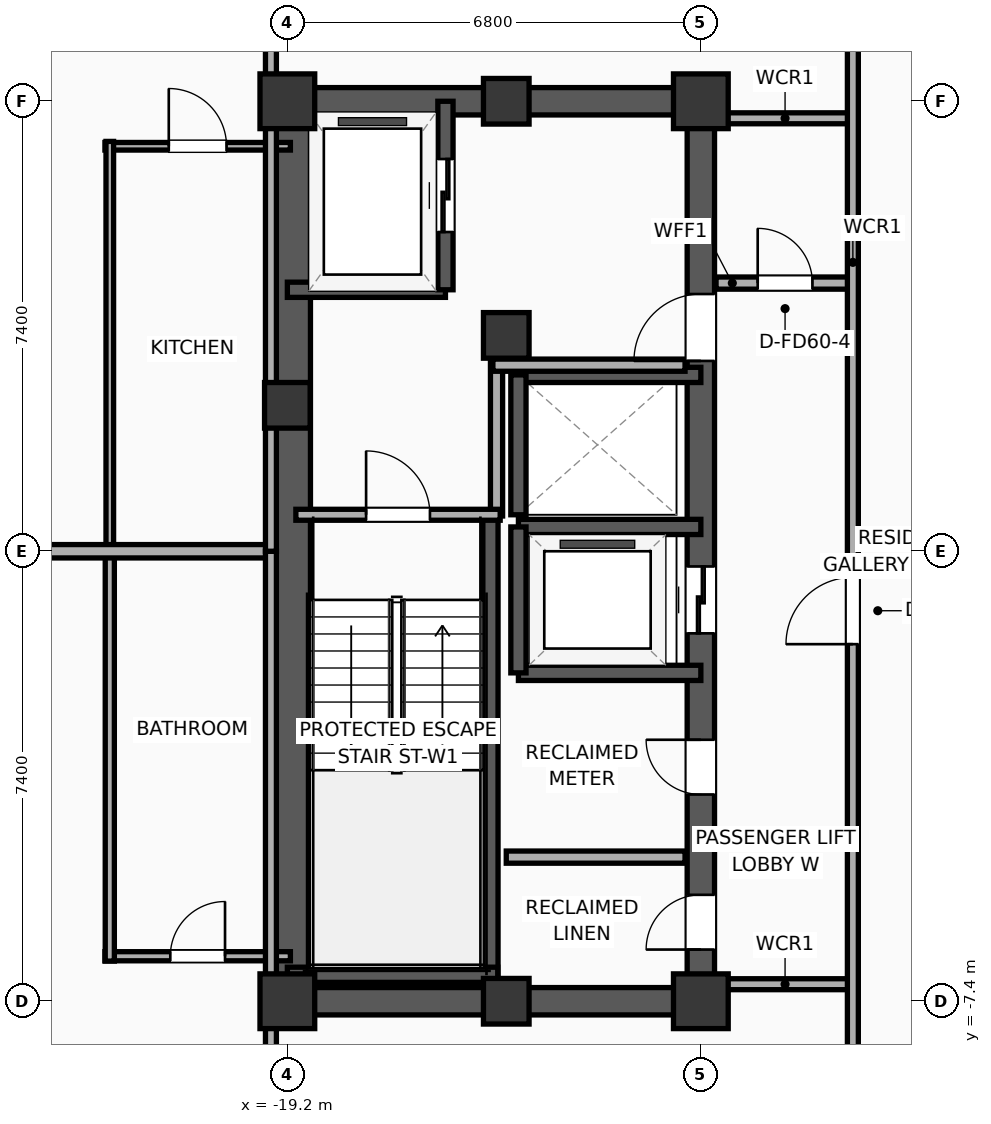
"""IFC4 building model, lengths in metres.
Left out: names, types, materials, properties, quantities, classifications, styles, units other than length and angle.
Written with IfcOpenShell. Run it as: python <this file> out.ifc"""

import sys

from ifc_helpers import new_model, si_unit, direction, frame, frame_2d, origin, origin_2d, place, context, subcontext, project, spatial, rectangle, extrude, element, fill, save


model = new_model("IFC4")
c1 = context("Model", 3, precision=1e-05, world=origin(), true_north=direction((0.0, 1.0)))
c2 = subcontext(c1, "Body", "Model", "MODEL_VIEW")
j1 = project(units=[si_unit("LENGTHUNIT", "METRE"), si_unit("PLANEANGLEUNIT", "RADIAN")], contexts=[c1])
p1 = place(None, origin())
s1 = spatial("IfcSite", under=j1, at=p1, CompositionType="ELEMENT")
p2 = place(p1, origin())
s2 = spatial("IfcBuilding", under=s1, at=p2, CompositionType="ELEMENT")
p3 = place(p2, frame((0.0, 0.0, 183.3)))
s3 = spatial("IfcBuildingStorey", under=s2, at=p3, CompositionType="ELEMENT", Elevation=183.3)
p4 = place(p3, frame((-19.2, -7.4, 0.0), z_axis=(0.0, 0.0, 1.0), x_axis=(1.0, 0.0, 0.0)))
e1 = element("IfcColumn", 1, at=p4, inside=s3, PredefinedType="COLUMN", context=c2, shape_type="SweptSolid", body=[
    extrude(rectangle(XDim=0.9, YDim=0.9, at=origin_2d()), origin(), (0.0, 0.0, 1.0), 3.9),
])
p5 = place(p3, frame((-19.2, 2.4, 0.0), z_axis=(0.0, 0.0, 1.0), x_axis=(1.0, 0.0, 0.0)))
e2 = element("IfcColumn", 2, at=p5, inside=s3, PredefinedType="COLUMN", context=c2, shape_type="SweptSolid", body=[
    extrude(rectangle(XDim=0.75, YDim=0.75, at=origin_2d()), origin(), (0.0, 0.0, 1.0), 3.9),
])
p6 = place(p3, frame((-19.2, 7.4, 0.0), z_axis=(0.0, 0.0, 1.0), x_axis=(1.0, 0.0, 0.0)))
e3 = element("IfcColumn", 3, at=p6, inside=s3, PredefinedType="COLUMN", context=c2, shape_type="SweptSolid", body=[
    extrude(rectangle(XDim=0.9, YDim=0.9, at=origin_2d()), origin(), (0.0, 0.0, 1.0), 3.9),
])
for number, where, z_axis, x_axis in (
    (4, (-15.6, -7.4, 0.0), (0.0, 0.0, 1.0), (1.0, 0.0, 0.0)),
    (5, (-15.6, 7.4, 0.0), (0.0, 0.0, 1.0), (1.0, 0.0, 0.0)),
):
    element("IfcColumn", number, at=place(p3, frame(where, z_axis=z_axis, x_axis=x_axis)), inside=s3, PredefinedType="COLUMN", context=c2, shape_type="SweptSolid", body=[
        extrude(rectangle(XDim=0.75, YDim=0.75, at=origin_2d()), origin(), (0.0, 0.0, 1.0), 3.9),
    ])
p7 = place(p3, frame((-12.4, -7.4, 0.0), z_axis=(0.0, 0.0, 1.0), x_axis=(1.0, 0.0, 0.0)))
e6 = element("IfcColumn", 6, at=p7, inside=s3, PredefinedType="COLUMN", context=c2, shape_type="SweptSolid", body=[
    extrude(rectangle(XDim=0.9, YDim=0.9, at=origin_2d()), origin(), (0.0, 0.0, 1.0), 3.9),
])
p8 = place(p3, frame((-15.6, 3.55, 0.0), z_axis=(0.0, 0.0, 1.0), x_axis=(1.0, 0.0, 0.0)))
e7 = element("IfcColumn", 7, at=p8, inside=s3, PredefinedType="COLUMN", context=c2, shape_type="SweptSolid", body=[
    extrude(rectangle(XDim=0.75, YDim=0.75, at=origin_2d()), origin(), (0.0, 0.0, 1.0), 3.9),
])
p9 = place(p3, frame((-12.4, 7.4, 0.0), z_axis=(0.0, 0.0, 1.0), x_axis=(1.0, 0.0, 0.0)))
e8 = element("IfcColumn", 8, at=p9, inside=s3, PredefinedType="COLUMN", context=c2, shape_type="SweptSolid", body=[
    extrude(rectangle(XDim=0.9, YDim=0.9, at=origin_2d()), origin(), (0.0, 0.0, 1.0), 3.9),
])
for number, where, z_axis, x_axis in (
    (9, (-19.425, -7.4, 0.0), (0.0, 0.0, 1.0), (1.0, 0.0, 0.0)),
    (10, (-19.425, 7.4, 0.0), (0.0, 0.0, 1.0), (1.0, 0.0, 0.0)),
):
    element("IfcWall", number, at=place(p3, frame(where, z_axis=z_axis, x_axis=x_axis)), inside=s3, PredefinedType="SHEAR", context=c2, shape_type="SweptSolid", body=[
        extrude(rectangle(XDim=7.25, YDim=0.45, at=frame_2d((3.625, 0.0))), origin(), (0.0, 0.0, 1.0), 3.65),
    ])
p10 = place(p3, frame((-19.145, -7.4, 0.0), z_axis=(0.0, 0.0, 1.0), x_axis=(0.0, 1.0, 0.0)))
e11 = element("IfcWall", 11, at=p10, inside=s3, PredefinedType="SHEAR", context=c2, shape_type="SweptSolid", body=[
    extrude(rectangle(XDim=14.8, YDim=0.65, at=frame_2d((7.4, 0.0))), origin(), (0.0, 0.0, 1.0), 3.65),
])
p11 = place(p3, frame((-12.4, -7.4, 0.0), z_axis=(0.0, 0.0, 1.0), x_axis=(0.0, 1.0, 0.0)))
e12 = element("IfcWall", 12, at=p11, inside=s3, PredefinedType="SHEAR", context=c2, shape_type="SweptSolid", body=[
    extrude(rectangle(XDim=14.8, YDim=0.45, at=frame_2d((7.4, 0.0))), origin(), (0.0, 0.0, 1.0), 3.65),
])
p12 = place(p11, frame((6.05, 0.0, 0.0)))
e13 = element("IfcOpeningElement", 13, at=p12, cuts=e12, PredefinedType="OPENING", context=c2, shape_type="SweptSolid", body=[
    extrude(rectangle(XDim=1.1, YDim=2.05, at=frame_2d((0.55, 1.025))), frame((0.0, 0.235, 0.0), z_axis=(0.0, -1.0, 0.0), x_axis=(1.0, 0.0, 0.0)), (0.0, 0.0, 1.0), 0.47),
])
p13 = place(p11, frame((10.53, 0.0, 0.0)))
e14 = element("IfcOpeningElement", 14, at=p13, cuts=e12, PredefinedType="OPENING", context=c2, shape_type="SweptSolid", body=[
    extrude(rectangle(XDim=1.1, YDim=2.05, at=frame_2d((0.55, 1.025))), frame((0.0, 0.235, 0.0), z_axis=(0.0, -1.0, 0.0), x_axis=(1.0, 0.0, 0.0)), (0.0, 0.0, 1.0), 0.47),
])
p14 = place(p11, frame((0.85, 0.0, 0.0)))
e15 = element("IfcOpeningElement", 15, at=p14, cuts=e12, PredefinedType="OPENING", context=c2, shape_type="SweptSolid", body=[
    extrude(rectangle(XDim=0.9, YDim=2.05, at=frame_2d((0.45, 1.025))), frame((0.0, 0.235, 0.0), z_axis=(0.0, -1.0, 0.0), x_axis=(1.0, 0.0, 0.0)), (0.0, 0.0, 1.0), 0.47),
])
p15 = place(p11, frame((3.4, 0.0, 0.0)))
e16 = element("IfcOpeningElement", 16, at=p15, cuts=e12, PredefinedType="OPENING", context=c2, shape_type="SweptSolid", body=[
    extrude(rectangle(XDim=0.9, YDim=2.05, at=frame_2d((0.45, 1.025))), frame((0.0, 0.235, 0.0), z_axis=(0.0, -1.0, 0.0), x_axis=(1.0, 0.0, 0.0)), (0.0, 0.0, 1.0), 0.47),
])
p16 = place(p3, frame((-15.86, -7.085, 0.0), z_axis=(0.0, 0.0, 1.0), x_axis=(0.0, 1.0, 0.0)))
e17 = element("IfcWall", 17, at=p16, inside=s3, PredefinedType="SOLIDWALL", context=c2, shape_type="SweptSolid", body=[
    extrude(rectangle(XDim=7.685, YDim=0.25, at=frame_2d((3.843, 0.0))), origin(), (0.0, 0.0, 1.0), 3.65),
])
p17 = place(p3, frame((-19.2, -6.965, 0.0), z_axis=(0.0, 0.0, 1.0), x_axis=(1.0, 0.0, 0.0)))
e18 = element("IfcWall", 18, at=p17, inside=s3, PredefinedType="SOLIDWALL", context=c2, shape_type="SweptSolid", body=[
    extrude(rectangle(XDim=3.46, YDim=0.25, at=frame_2d((1.73, 0.0))), origin(), (0.0, 0.0, 1.0), 3.65),
])
p18 = place(p3, frame((-19.2, 4.3, 0.0), z_axis=(0.0, 0.0, 1.0), x_axis=(1.0, 0.0, 0.0)))
e19 = element("IfcWall", 19, at=p18, inside=s3, PredefinedType="SOLIDWALL", context=c2, shape_type="SweptSolid", body=[
    extrude(rectangle(XDim=2.6, YDim=0.25, at=frame_2d((1.3, 0.0))), origin(), (0.0, 0.0, 1.0), 3.65),
])
p19 = place(p3, frame((-16.6, 4.3, 0.0), z_axis=(0.0, 0.0, 1.0), x_axis=(0.0, 1.0, 0.0)))
e20 = element("IfcWall", 20, at=p19, inside=s3, PredefinedType="SOLIDWALL", context=c2, shape_type="SweptSolid", body=[
    extrude(rectangle(XDim=3.1, YDim=0.25, at=frame_2d((1.55, 0.0))), origin(), (0.0, 0.0, 1.0), 3.65),
])
p20 = place(p19, frame((0.95, 0.0, 0.0)))
e21 = element("IfcOpeningElement", 21, at=p20, cuts=e20, PredefinedType="OPENING", context=c2, shape_type="SweptSolid", body=[
    extrude(rectangle(XDim=1.2, YDim=2.05, at=frame_2d((0.6, 1.025))), frame((0.0, 0.135, 0.0), z_axis=(0.0, -1.0, 0.0), x_axis=(1.0, 0.0, 0.0)), (0.0, 0.0, 1.0), 0.27),
])
for number, where, z_axis, x_axis in (
    (22, (-15.4, -2.0, 0.0), (0.0, 0.0, 1.0), (1.0, 0.0, 0.0)),
    (23, (-12.4, 0.4, 0.0), (0.0, 0.0, 1.0), (-1.0, 0.0, 0.0)),
):
    element("IfcWall", number, at=place(p3, frame(where, z_axis=z_axis, x_axis=x_axis)), inside=s3, PredefinedType="SOLIDWALL", context=c2, shape_type="SweptSolid", body=[
        extrude(rectangle(XDim=3.0, YDim=0.25, at=frame_2d((1.5, 0.0))), origin(), (0.0, 0.0, 1.0), 3.65),
    ])
p21 = place(p3, frame((-15.4, 0.4, 0.0), z_axis=(0.0, 0.0, 1.0), x_axis=(0.0, -1.0, 0.0)))
e24 = element("IfcWall", 24, at=p21, inside=s3, PredefinedType="SOLIDWALL", context=c2, shape_type="SweptSolid", body=[
    extrude(rectangle(XDim=2.4, YDim=0.25, at=frame_2d((1.2, 0.0))), origin(), (0.0, 0.0, 1.0), 3.65),
])
p22 = place(p3, frame((-12.4, 2.9, 0.0), z_axis=(0.0, 0.0, 1.0), x_axis=(-1.0, 0.0, 0.0)))
e25 = element("IfcWall", 25, at=p22, inside=s3, PredefinedType="SOLIDWALL", context=c2, shape_type="SweptSolid", body=[
    extrude(rectangle(XDim=3.0, YDim=0.25, at=frame_2d((1.5, 0.0))), origin(), (0.0, 0.0, 1.0), 3.65),
])
p23 = place(p3, frame((-15.4, 2.9, 0.0), z_axis=(0.0, 0.0, 1.0), x_axis=(0.0, -1.0, 0.0)))
e26 = element("IfcWall", 26, at=p23, inside=s3, PredefinedType="SOLIDWALL", context=c2, shape_type="SweptSolid", body=[
    extrude(rectangle(XDim=2.3, YDim=0.25, at=frame_2d((1.15, 0.0))), origin(), (0.0, 0.0, 1.0), 3.65),
])
p24 = place(p3, frame((-15.76, 0.58, 0.0), z_axis=(0.0, 0.0, 1.0), x_axis=(0.0, 1.0, 0.0)))
e27 = element("IfcWall", 27, at=p24, inside=s3, PredefinedType="PARTITIONING", context=c2, shape_type="SweptSolid", body=[
    extrude(rectangle(XDim=2.52, YDim=0.2, at=frame_2d((1.26, 0.0))), origin(), (0.0, 0.0, 1.0), 3.65),
])
p25 = place(p3, frame((-15.82, 3.06, 0.0), z_axis=(0.0, 0.0, 1.0), x_axis=(1.0, 0.0, 0.0)))
e28 = element("IfcWall", 28, at=p25, inside=s3, PredefinedType="PARTITIONING", context=c2, shape_type="SweptSolid", body=[
    extrude(rectangle(XDim=3.16, YDim=0.2, at=frame_2d((1.58, 0.0))), origin(), (0.0, 0.0, 1.0), 3.65),
])
p26 = place(p3, frame((-19.06, 0.6, 0.0), z_axis=(0.0, 0.0, 1.0), x_axis=(1.0, 0.0, 0.0)))
e29 = element("IfcWall", 29, at=p26, inside=s3, PredefinedType="PARTITIONING", context=c2, shape_type="SweptSolid", body=[
    extrude(rectangle(XDim=3.36, YDim=0.18, at=frame_2d((1.68, 0.0))), origin(), (0.0, 0.0, 1.0), 3.65),
])
p27 = place(p26, frame((1.155, 0.0, 0.0)))
e30 = element("IfcOpeningElement", 30, at=p27, cuts=e29, PredefinedType="OPENING", context=c2, shape_type="SweptSolid", body=[
    extrude(rectangle(XDim=1.05, YDim=2.05, at=frame_2d((0.525, 1.025))), frame((0.0, 0.1, 0.0), z_axis=(0.0, -1.0, 0.0), x_axis=(1.0, 0.0, 0.0)), (0.0, 0.0, 1.0), 0.2),
])
p28 = place(p3, frame((-15.6, -5.03, 0.0), z_axis=(0.0, 0.0, 1.0), x_axis=(1.0, 0.0, 0.0)))
e31 = element("IfcWall", 31, at=p28, inside=s3, PredefinedType="PARTITIONING", context=c2, shape_type="SweptSolid", body=[
    extrude(rectangle(XDim=2.94, YDim=0.2, at=frame_2d((1.47, 0.0))), origin(), (0.0, 0.0, 1.0), 3.65),
])
p29 = place(p3, frame((-12.15, 4.41, 0.0), z_axis=(0.0, 0.0, 1.0), x_axis=(1.0, 0.0, 0.0)))
e32 = element("IfcWall", 32, at=p29, inside=s3, PredefinedType="PARTITIONING", context=c2, shape_type="SweptSolid", body=[
    extrude(rectangle(XDim=2.27, YDim=0.2, at=frame_2d((1.135, 0.0))), origin(), (0.0, 0.0, 1.0), 3.65),
])
p30 = place(p29, frame((0.685, 0.0, 0.0)))
e33 = element("IfcOpeningElement", 33, at=p30, cuts=e32, PredefinedType="OPENING", context=c2, shape_type="SweptSolid", body=[
    extrude(rectangle(XDim=0.9, YDim=2.05, at=frame_2d((0.45, 1.025))), frame((0.0, 0.11, 0.0), z_axis=(0.0, -1.0, 0.0), x_axis=(1.0, 0.0, 0.0)), (0.0, 0.0, 1.0), 0.22),
])
for number, where, z_axis, x_axis in (
    (34, (-12.15, 7.12, 0.0), (0.0, 0.0, 1.0), (1.0, 0.0, 0.0)),
    (35, (-12.15, -7.12, 0.0), (0.0, 0.0, 1.0), (1.0, 0.0, 0.0)),
):
    element("IfcWall", number, at=place(p3, frame(where, z_axis=z_axis, x_axis=x_axis)), inside=s3, PredefinedType="PARTITIONING", context=c2, shape_type="SweptSolid", body=[
        extrude(rectangle(XDim=2.27, YDim=0.18, at=frame_2d((1.135, 0.0))), origin(), (0.0, 0.0, 1.0), 3.65),
    ])
p31 = place(p3, frame((-9.9, -9.78, 0.0), z_axis=(0.0, 0.0, 1.0), x_axis=(0.0, 1.0, 0.0)))
e36 = element("IfcWall", 36, at=p31, inside=s3, PredefinedType="PARTITIONING", context=c2, shape_type="SweptSolid", body=[
    extrude(rectangle(XDim=19.56, YDim=0.18, at=frame_2d((9.78, 0.0))), origin(), (0.0, 0.0, 1.0), 3.65),
])
p32 = place(p31, frame((8.252, 0.0, 0.0)))
e37 = element("IfcOpeningElement", 37, at=p32, cuts=e36, PredefinedType="OPENING", context=c2, shape_type="SweptSolid", body=[
    extrude(rectangle(XDim=1.1, YDim=2.05, at=frame_2d((0.55, 1.025))), frame((0.0, 0.1, 0.0), z_axis=(0.0, -1.0, 0.0), x_axis=(1.0, 0.0, 0.0)), (0.0, 0.0, 1.0), 0.2),
])
p33 = place(p3, frame((-22.2, -6.66, 0.0), z_axis=(0.0, 0.0, 1.0), x_axis=(1.0, 0.0, 0.0)))
e38 = element("IfcWall", 38, at=p33, inside=s3, PredefinedType="PLUMBINGWALL", context=c2, shape_type="SweptSolid", body=[
    extrude(rectangle(XDim=3.05, YDim=0.15, at=frame_2d((1.525, 0.0))), origin(), (0.0, 0.0, 1.0), 3.65),
])
p34 = place(p33, frame((1.075, 0.0, 0.0)))
e39 = element("IfcOpeningElement", 39, at=p34, cuts=e38, PredefinedType="OPENING", context=c2, shape_type="SweptSolid", body=[
    extrude(rectangle(XDim=0.9, YDim=2.05, at=frame_2d((0.45, 1.025))), frame((0.0, 0.085, 0.0), z_axis=(0.0, -1.0, 0.0), x_axis=(1.0, 0.0, 0.0)), (0.0, 0.0, 1.0), 0.17),
])
p35 = place(p3, frame((-22.12, -6.74, 0.0), z_axis=(0.0, 0.0, 1.0), x_axis=(0.0, 1.0, 0.0)))
e40 = element("IfcWall", 40, at=p35, inside=s3, PredefinedType="PLUMBINGWALL", context=c2, shape_type="SweptSolid", body=[
    extrude(rectangle(XDim=6.72, YDim=0.15, at=frame_2d((3.36, 0.0))), origin(), (0.0, 0.0, 1.0), 3.65),
])
p36 = place(p3, frame((-22.2, 6.66, 0.0), z_axis=(0.0, 0.0, 1.0), x_axis=(1.0, 0.0, 0.0)))
e41 = element("IfcWall", 41, at=p36, inside=s3, PredefinedType="PARTITIONING", context=c2, shape_type="SweptSolid", body=[
    extrude(rectangle(XDim=3.05, YDim=0.125, at=frame_2d((1.525, 0.0))), origin(), (0.0, 0.0, 1.0), 3.04),
])
p37 = place(p36, frame((1.05, 0.0, 0.0)))
e42 = element("IfcOpeningElement", 42, at=p37, cuts=e41, PredefinedType="OPENING", context=c2, shape_type="SweptSolid", body=[
    extrude(rectangle(XDim=0.95, YDim=2.05, at=frame_2d((0.475, 1.025))), frame((0.0, 0.073, 0.0), z_axis=(0.0, -1.0, 0.0), x_axis=(1.0, 0.0, 0.0)), (0.0, 0.0, 1.0), 0.145),
])
p38 = place(p3, frame((-22.12, 0.02, 0.0), z_axis=(0.0, 0.0, 1.0), x_axis=(0.0, 1.0, 0.0)))
e43 = element("IfcWall", 43, at=p38, inside=s3, PredefinedType="PARTITIONING", context=c2, shape_type="SweptSolid", body=[
    extrude(rectangle(XDim=6.72, YDim=0.125, at=frame_2d((3.36, 0.0))), origin(), (0.0, 0.0, 1.0), 3.65),
])
p39 = place(p3, frame((-19.47, 0.0, 0.0), z_axis=(0.0, 0.0, 1.0), x_axis=(-1.0, 0.0, 0.0)))
e44 = element("IfcWall", 44, at=p39, inside=s3, PredefinedType="PARTITIONING", context=c2, shape_type="SweptSolid", body=[
    extrude(rectangle(XDim=13.586, YDim=0.22, at=frame_2d((6.793, 0.0))), origin(), (0.0, 0.0, 1.0), 3.65),
])
p40 = place(p3, frame((-19.47, -22.652, 0.0), z_axis=(0.0, 0.0, 1.0), x_axis=(0.0, 1.0, 0.0)))
e45 = element("IfcWall", 45, at=p40, inside=s3, PredefinedType="PARTITIONING", context=c2, shape_type="SweptSolid", body=[
    extrude(rectangle(XDim=22.652, YDim=0.18, at=frame_2d((11.326, 0.0))), origin(), (0.0, 0.0, 1.0), 3.65),
])
p41 = place(p40, frame((11.771, 0.0, 0.0)))
e46 = element("IfcOpeningElement", 46, at=p41, cuts=e45, PredefinedType="OPENING", context=c2, shape_type="SweptSolid", body=[
    extrude(rectangle(XDim=0.9, YDim=2.05, at=frame_2d((0.45, 1.025))), frame((0.0, 0.1, 0.0), z_axis=(0.0, -1.0, 0.0), x_axis=(1.0, 0.0, 0.0)), (0.0, 0.0, 1.0), 0.2),
])
p42 = place(p3, frame((-19.47, 0.0, 0.0), z_axis=(0.0, 0.0, 1.0), x_axis=(0.0, 1.0, 0.0)))
e47 = element("IfcWall", 47, at=p42, inside=s3, PredefinedType="PARTITIONING", context=c2, shape_type="SweptSolid", body=[
    extrude(rectangle(XDim=18.031, YDim=0.18, at=frame_2d((9.016, 0.0))), origin(), (0.0, 0.0, 1.0), 3.04),
])
p43 = place(p42, frame((9.979, 0.0, 0.0)))
e48 = element("IfcOpeningElement", 48, at=p43, cuts=e47, PredefinedType="OPENING", context=c2, shape_type="SweptSolid", body=[
    extrude(rectangle(XDim=0.9, YDim=2.05, at=frame_2d((0.45, 1.025))), frame((0.0, 0.1, 0.0), z_axis=(0.0, -1.0, 0.0), x_axis=(1.0, 0.0, 0.0)), (0.0, 0.0, 1.0), 0.2),
])
p44 = place(p20, origin())
e49 = element("IfcDoor", 49, at=p44, inside=s3, OperationType="SLIDING_TO_LEFT", PredefinedType="DOOR", context=c2, shape_type="SweptSolid", body=[
    extrude(rectangle(XDim=1.2, YDim=2.05, at=frame_2d((0.6, 1.025))), frame((0.0, 0.025, 0.0), z_axis=(0.0, -1.0, 0.0), x_axis=(1.0, 0.0, 0.0)), (0.0, 0.0, 1.0), 0.05),
])
fill(e21, e49)
p45 = place(p12, origin())
e50 = element("IfcDoor", 50, at=p45, inside=s3, OperationType="SLIDING_TO_LEFT", PredefinedType="DOOR", context=c2, shape_type="SweptSolid", body=[
    extrude(rectangle(XDim=1.1, YDim=2.05, at=frame_2d((0.55, 1.025))), frame((0.0, 0.025, 0.0), z_axis=(0.0, -1.0, 0.0), x_axis=(1.0, 0.0, 0.0)), (0.0, 0.0, 1.0), 0.05),
])
fill(e13, e50)
p46 = place(p27, origin())
e51 = element("IfcDoor", 51, at=p46, inside=s3, OperationType="SINGLE_SWING_LEFT", PredefinedType="DOOR", context=c2, shape_type="SweptSolid", body=[
    extrude(rectangle(XDim=1.05, YDim=2.05, at=frame_2d((0.525, 1.025))), frame((0.0, 0.025, 0.0), z_axis=(0.0, -1.0, 0.0), x_axis=(1.0, 0.0, 0.0)), (0.0, 0.0, 1.0), 0.05),
])
fill(e30, e51)
p47 = place(p30, origin())
e52 = element("IfcDoor", 52, at=p47, inside=s3, OperationType="SINGLE_SWING_LEFT", PredefinedType="DOOR", context=c2, shape_type="SweptSolid", body=[
    extrude(rectangle(XDim=0.9, YDim=2.05, at=frame_2d((0.45, 1.025))), frame((0.0, 0.025, 0.0), z_axis=(0.0, -1.0, 0.0), x_axis=(1.0, 0.0, 0.0)), (0.0, 0.0, 1.0), 0.05),
])
fill(e33, e52)
p48 = place(p32, origin())
e53 = element("IfcDoor", 53, at=p48, inside=s3, OperationType="SINGLE_SWING_LEFT", PredefinedType="DOOR", context=c2, shape_type="SweptSolid", body=[
    extrude(rectangle(XDim=1.1, YDim=2.05, at=frame_2d((0.55, 1.025))), frame((0.0, 0.025, 0.0), z_axis=(0.0, -1.0, 0.0), x_axis=(1.0, 0.0, 0.0)), (0.0, 0.0, 1.0), 0.05),
])
fill(e37, e53)
p49 = place(p34, origin())
e54 = element("IfcDoor", 54, at=p49, inside=s3, OperationType="SINGLE_SWING_RIGHT", PredefinedType="DOOR", context=c2, shape_type="SweptSolid", body=[
    extrude(rectangle(XDim=0.9, YDim=2.05, at=frame_2d((0.45, 1.025))), frame((0.0, 0.025, 0.0), z_axis=(0.0, -1.0, 0.0), x_axis=(1.0, 0.0, 0.0)), (0.0, 0.0, 1.0), 0.05),
])
fill(e39, e54)
p50 = place(p37, origin())
e55 = element("IfcDoor", 55, at=p50, inside=s3, OperationType="SINGLE_SWING_LEFT", PredefinedType="DOOR", context=c2, shape_type="SweptSolid", body=[
    extrude(rectangle(XDim=0.95, YDim=2.05, at=frame_2d((0.475, 1.025))), frame((0.0, 0.025, 0.0), z_axis=(0.0, -1.0, 0.0), x_axis=(1.0, 0.0, 0.0)), (0.0, 0.0, 1.0), 0.05),
])
fill(e42, e55)
p51 = place(p13, origin())
e56 = element("IfcDoor", 56, at=p51, inside=s3, OperationType="SINGLE_SWING_LEFT", PredefinedType="DOOR", context=c2, shape_type="SweptSolid", body=[
    extrude(rectangle(XDim=1.1, YDim=2.05, at=frame_2d((0.55, 1.025))), frame((0.0, 0.025, 0.0), z_axis=(0.0, -1.0, 0.0), x_axis=(1.0, 0.0, 0.0)), (0.0, 0.0, 1.0), 0.05),
])
fill(e14, e56)
p52 = place(p14, origin())
e57 = element("IfcDoor", 57, at=p52, inside=s3, OperationType="SINGLE_SWING_LEFT", PredefinedType="DOOR", context=c2, shape_type="SweptSolid", body=[
    extrude(rectangle(XDim=0.9, YDim=2.05, at=frame_2d((0.45, 1.025))), frame((0.0, 0.025, 0.0), z_axis=(0.0, -1.0, 0.0), x_axis=(1.0, 0.0, 0.0)), (0.0, 0.0, 1.0), 0.05),
])
fill(e15, e57)
p53 = place(p15, origin())
e58 = element("IfcDoor", 58, at=p53, inside=s3, OperationType="SINGLE_SWING_RIGHT", PredefinedType="DOOR", context=c2, shape_type="SweptSolid", body=[
    extrude(rectangle(XDim=0.9, YDim=2.05, at=frame_2d((0.45, 1.025))), frame((0.0, 0.025, 0.0), z_axis=(0.0, -1.0, 0.0), x_axis=(1.0, 0.0, 0.0)), (0.0, 0.0, 1.0), 0.05),
])
fill(e16, e58)
save(model, sys.argv[1])
